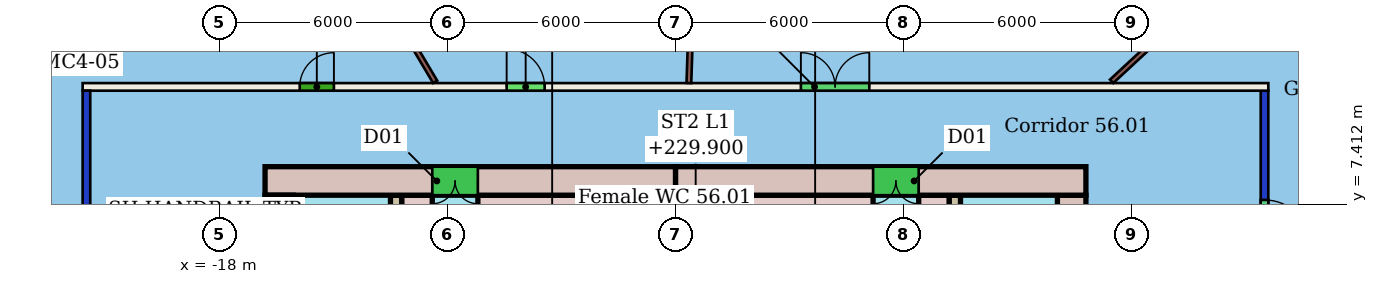
"""IFC4 building model, lengths in metres.
Left out: names, types, materials, properties, quantities, classifications, styles, units other than length and angle.
Written with IfcOpenShell. Run it as: python <this file> out.ifc"""

import sys

from ifc_helpers import new_model, si_unit, direction, frame, frame_2d, origin, place, context, subcontext, project, spatial, rectangle, extrude, element, fill, save


model = new_model("IFC4")
c1 = context("Model", 3, precision=1e-05, world=origin(), true_north=direction((0.0, 1.0)))
c2 = subcontext(c1, "Body", "Model", "MODEL_VIEW")
j1 = project(units=[si_unit("LENGTHUNIT", "METRE"), si_unit("PLANEANGLEUNIT", "RADIAN")], contexts=[c1])
p1 = place(None, origin())
s1 = spatial("IfcSite", under=j1, at=p1, CompositionType="ELEMENT")
p2 = place(p1, origin())
s2 = spatial("IfcBuilding", under=s1, at=p2, CompositionType="ELEMENT")
p3 = place(p2, frame((0.0, 0.0, 228.1)))
s3 = spatial("IfcBuildingStorey", under=s2, at=p3, CompositionType="ELEMENT", Elevation=228.1)
p4 = place(p3, frame((-21.5, -10.4, 0.0), z_axis=(0.0, 0.0, 1.0), x_axis=(0.0, 1.0, 0.0)))
e1 = element("IfcWall", 1, at=p4, inside=s3, PredefinedType="PARTITIONING", context=c2, shape_type="SweptSolid", body=[
    extrude(rectangle(XDim=20.8, YDim=0.2, at=frame_2d((10.4, 0.0))), origin(), (0.0, 0.0, 1.0), 3.05),
])
p5 = place(p4, frame((14.597, 0.0, 0.0)))
e2 = element("IfcOpeningElement", 2, at=p5, cuts=e1, PredefinedType="OPENING", context=c2, shape_type="SweptSolid", body=[
    extrude(rectangle(XDim=1.0, YDim=2.4, at=frame_2d((0.5, 1.2))), frame((0.0, 0.11, 0.0), z_axis=(0.0, -1.0, 0.0), x_axis=(1.0, 0.0, 0.0)), (0.0, 0.0, 1.0), 0.22),
])
p6 = place(p4, frame((7.884, 0.0, 0.0)))
e3 = element("IfcOpeningElement", 3, at=p6, cuts=e1, PredefinedType="OPENING", context=c2, shape_type="SweptSolid", body=[
    extrude(rectangle(XDim=1.0, YDim=2.4, at=frame_2d((0.5, 1.2))), frame((0.0, 0.11, 0.0), z_axis=(0.0, -1.0, 0.0), x_axis=(1.0, 0.0, 0.0)), (0.0, 0.0, 1.0), 0.22),
])
p7 = place(p3, frame((-21.6, 10.5, 0.0), z_axis=(0.0, 0.0, 1.0), x_axis=(1.0, 0.0, 0.0)))
e4 = element("IfcWall", 4, at=p7, inside=s3, PredefinedType="PARTITIONING", context=c2, shape_type="SweptSolid", body=[
    extrude(rectangle(XDim=31.2, YDim=0.2, at=frame_2d((15.6, 0.0))), origin(), (0.0, 0.0, 1.0), 3.45),
])
p8 = place(p7, frame((11.157, 0.0, 0.0)))
e5 = element("IfcOpeningElement", 5, at=p8, cuts=e4, PredefinedType="OPENING", context=c2, shape_type="SweptSolid", body=[
    extrude(rectangle(XDim=1.0, YDim=2.4, at=frame_2d((0.5, 1.2))), frame((0.0, 0.11, 0.0), z_axis=(0.0, -1.0, 0.0), x_axis=(1.0, 0.0, 0.0)), (0.0, 0.0, 1.0), 0.22),
])
p9 = place(p7, frame((5.712, 0.0, 0.0)))
e6 = element("IfcOpeningElement", 6, at=p9, cuts=e4, PredefinedType="OPENING", context=c2, shape_type="SweptSolid", body=[
    extrude(rectangle(XDim=0.9, YDim=2.1, at=frame_2d((0.45, 1.05))), frame((0.0, 0.11, 0.0), z_axis=(0.0, -1.0, 0.0), x_axis=(1.0, 0.0, 0.0)), (0.0, 0.0, 1.0), 0.22),
])
p10 = place(p7, frame((18.9, 0.0, 0.0)))
e7 = element("IfcOpeningElement", 7, at=p10, cuts=e4, PredefinedType="OPENING", context=c2, shape_type="SweptSolid", body=[
    extrude(rectangle(XDim=1.8, YDim=2.1, at=frame_2d((0.9, 1.05))), frame((0.0, 0.11, 0.0), z_axis=(0.0, -1.0, 0.0), x_axis=(1.0, 0.0, 0.0)), (0.0, 0.0, 1.0), 0.22),
])
p11 = place(p3, frame((9.5, 10.4, 0.0), z_axis=(0.0, 0.0, 1.0), x_axis=(0.0, -1.0, 0.0)))
e8 = element("IfcWall", 8, at=p11, inside=s3, PredefinedType="PARTITIONING", context=c2, shape_type="SweptSolid", body=[
    extrude(rectangle(XDim=20.8, YDim=0.2, at=frame_2d((10.4, 0.0))), origin(), (0.0, 0.0, 1.0), 3.05),
])
p12 = place(p11, frame((16.182, 0.0, 0.0)))
e9 = element("IfcOpeningElement", 9, at=p12, cuts=e8, PredefinedType="OPENING", context=c2, shape_type="SweptSolid", body=[
    extrude(rectangle(XDim=1.0, YDim=2.4, at=frame_2d((0.5, 1.2))), frame((0.0, 0.11, 0.0), z_axis=(0.0, -1.0, 0.0), x_axis=(1.0, 0.0, 0.0)), (0.0, 0.0, 1.0), 0.22),
])
p13 = place(p11, frame((12.086, 0.0, 0.0)))
e10 = element("IfcOpeningElement", 10, at=p13, cuts=e8, PredefinedType="OPENING", context=c2, shape_type="SweptSolid", body=[
    extrude(rectangle(XDim=1.0, YDim=2.4, at=frame_2d((0.5, 1.2))), frame((0.0, 0.11, 0.0), z_axis=(0.0, -1.0, 0.0), x_axis=(1.0, 0.0, 0.0)), (0.0, 0.0, 1.0), 0.22),
])
p14 = place(p11, frame((6.779, 0.0, 0.0)))
e11 = element("IfcOpeningElement", 11, at=p14, cuts=e8, PredefinedType="OPENING", context=c2, shape_type="SweptSolid", body=[
    extrude(rectangle(XDim=0.9, YDim=2.1, at=frame_2d((0.45, 1.05))), frame((0.0, 0.11, 0.0), z_axis=(0.0, -1.0, 0.0), x_axis=(1.0, 0.0, 0.0)), (0.0, 0.0, 1.0), 0.22),
])
p15 = place(p11, frame((2.875, 0.0, 0.0)))
e12 = element("IfcOpeningElement", 12, at=p15, cuts=e8, PredefinedType="OPENING", context=c2, shape_type="SweptSolid", body=[
    extrude(rectangle(XDim=1.2, YDim=2.4, at=frame_2d((0.6, 1.2))), frame((0.0, 0.11, 0.0), z_axis=(0.0, -1.0, 0.0), x_axis=(1.0, 0.0, 0.0)), (0.0, 0.0, 1.0), 0.22),
])
p16 = place(p3, frame((-5.193, 24.265, 0.0), z_axis=(0.0, 0.0, 1.0), x_axis=(-0.033235742761, -0.999447540096, 0.0)))
e13 = element("IfcWall", 13, at=p16, inside=s3, PredefinedType="PARTITIONING", context=c2, shape_type="SweptSolid", body=[
    extrude(rectangle(XDim=13.67, YDim=0.125, at=frame_2d((6.835, 0.0))), origin(), (0.0, 0.0, 1.0), 3.45),
])
p17 = place(p3, frame((-17.283, 18.97, 0.0), z_axis=(0.0, 0.0, 1.0), x_axis=(0.51119848964, -0.859462683419, 0.0)))
e14 = element("IfcWall", 14, at=p17, inside=s3, PredefinedType="PARTITIONING", context=c2, shape_type="SweptSolid", body=[
    extrude(rectangle(XDim=9.702, YDim=0.125, at=frame_2d((4.851, 0.0))), origin(), (0.0, 0.0, 1.0), 3.45),
])
p18 = place(p3, frame((-26.344, 8.562, 0.0), z_axis=(0.0, 0.0, 1.0), x_axis=(0.921707152803, -0.387886484002, 0.0)))
e15 = element("IfcWall", 15, at=p18, inside=s3, PredefinedType="PARTITIONING", context=c2, shape_type="SweptSolid", body=[
    extrude(rectangle(XDim=5.121, YDim=0.125, at=frame_2d((2.561, 0.0))), origin(), (0.0, 0.0, 1.0), 3.45),
])
p19 = place(p3, frame((13.437, 18.031, 0.0), z_axis=(0.0, 0.0, 1.0), x_axis=(-0.733128123603, -0.680090548665, 0.0)))
e16 = element("IfcWall", 16, at=p19, inside=s3, PredefinedType="PARTITIONING", context=c2, shape_type="SweptSolid", body=[
    extrude(rectangle(XDim=10.859, YDim=0.125, at=frame_2d((5.429, 0.0))), origin(), (0.0, 0.0, 1.0), 3.45),
])
p20 = place(p3, frame((4.8, 8.025, 0.0), z_axis=(0.0, 0.0, 1.0), x_axis=(-1.0, 0.0, 0.0)))
e17 = element("IfcWall", 17, at=p20, inside=s3, PredefinedType="SHEAR", context=c2, shape_type="SweptSolid", body=[
    extrude(rectangle(XDim=10.8, YDim=0.75, at=frame_2d((5.4, 0.0))), origin(), (0.0, 0.0, 1.0), 3.3),
])
p21 = place(p20, frame((4.4, 0.0, 0.0)))
e18 = element("IfcOpeningElement", 18, at=p21, cuts=e17, PredefinedType="OPENING", context=c2, shape_type="SweptSolid", body=[
    extrude(rectangle(XDim=1.2, YDim=2.1, at=frame_2d((0.6, 1.05))), frame((0.0, 0.385, 0.0), z_axis=(0.0, -1.0, 0.0), x_axis=(1.0, 0.0, 0.0)), (0.0, 0.0, 1.0), 0.77),
])
p22 = place(p3, frame((-6.0, 8.025, 0.0), z_axis=(0.0, 0.0, 1.0), x_axis=(-1.0, 0.0, 0.0)))
e19 = element("IfcWall", 19, at=p22, inside=s3, PredefinedType="SHEAR", context=c2, shape_type="SweptSolid", body=[
    extrude(rectangle(XDim=10.8, YDim=0.75, at=frame_2d((5.4, 0.0))), origin(), (0.0, 0.0, 1.0), 3.3),
])
p23 = place(p22, frame((5.2, 0.0, 0.0)))
e20 = element("IfcOpeningElement", 20, at=p23, cuts=e19, PredefinedType="OPENING", context=c2, shape_type="SweptSolid", body=[
    extrude(rectangle(XDim=1.2, YDim=2.1, at=frame_2d((0.6, 1.05))), frame((0.0, 0.385, 0.0), z_axis=(0.0, -1.0, 0.0), x_axis=(1.0, 0.0, 0.0)), (0.0, 0.0, 1.0), 0.77),
])
p24 = place(p3, frame((-16.425, 7.65, 0.0), z_axis=(0.0, 0.0, 1.0), x_axis=(0.0, -1.0, 0.0)))
e21 = element("IfcWall", 21, at=p24, inside=s3, PredefinedType="SHEAR", context=c2, shape_type="SweptSolid", body=[
    extrude(rectangle(XDim=15.3, YDim=0.75, at=frame_2d((7.65, 0.0))), origin(), (0.0, 0.0, 1.0), 3.3),
])
p25 = place(p24, frame((11.25, 0.0, 0.0)))
e22 = element("IfcOpeningElement", 22, at=p25, cuts=e21, PredefinedType="OPENING", context=c2, shape_type="SweptSolid", body=[
    extrude(rectangle(XDim=1.2, YDim=2.1, at=frame_2d((0.6, 1.05))), frame((0.0, 0.385, 0.0), z_axis=(0.0, -1.0, 0.0), x_axis=(1.0, 0.0, 0.0)), (0.0, 0.0, 1.0), 0.77),
])
p26 = place(p24, frame((2.85, 0.0, 0.0)))
e23 = element("IfcOpeningElement", 23, at=p26, cuts=e21, PredefinedType="OPENING", context=c2, shape_type="SweptSolid", body=[
    extrude(rectangle(XDim=1.2, YDim=2.1, at=frame_2d((0.6, 1.05))), frame((0.0, 0.385, 0.0), z_axis=(0.0, -1.0, 0.0), x_axis=(1.0, 0.0, 0.0)), (0.0, 0.0, 1.0), 0.77),
])
p27 = place(p3, frame((4.425, -7.65, 0.0), z_axis=(0.0, 0.0, 1.0), x_axis=(0.0, 1.0, 0.0)))
e24 = element("IfcWall", 24, at=p27, inside=s3, PredefinedType="SHEAR", context=c2, shape_type="SweptSolid", body=[
    extrude(rectangle(XDim=15.3, YDim=0.75, at=frame_2d((7.65, 0.0))), origin(), (0.0, 0.0, 1.0), 3.3),
])
p28 = place(p27, frame((2.85, 0.0, 0.0)))
e25 = element("IfcOpeningElement", 25, at=p28, cuts=e24, PredefinedType="OPENING", context=c2, shape_type="SweptSolid", body=[
    extrude(rectangle(XDim=1.2, YDim=2.1, at=frame_2d((0.6, 1.05))), frame((0.0, 0.385, 0.0), z_axis=(0.0, -1.0, 0.0), x_axis=(1.0, 0.0, 0.0)), (0.0, 0.0, 1.0), 0.77),
])
p29 = place(p27, frame((11.25, 0.0, 0.0)))
e26 = element("IfcOpeningElement", 26, at=p29, cuts=e24, PredefinedType="OPENING", context=c2, shape_type="SweptSolid", body=[
    extrude(rectangle(XDim=1.2, YDim=2.1, at=frame_2d((0.6, 1.05))), frame((0.0, 0.385, 0.0), z_axis=(0.0, -1.0, 0.0), x_axis=(1.0, 0.0, 0.0)), (0.0, 0.0, 1.0), 0.77),
])
p30 = place(p3, frame((-13.35, 7.65, 0.0), z_axis=(0.0, 0.0, 1.0), x_axis=(0.0, -1.0, 0.0)))
e27 = element("IfcWall", 27, at=p30, inside=s3, PredefinedType="SHEAR", context=c2, shape_type="SweptSolid", body=[
    extrude(rectangle(XDim=15.3, YDim=0.3, at=frame_2d((7.65, 0.0))), origin(), (0.0, 0.0, 1.0), 3.3),
])
p31 = place(p30, frame((6.9, 0.0, 0.0)))
e28 = element("IfcOpeningElement", 28, at=p31, cuts=e27, PredefinedType="OPENING", context=c2, shape_type="SweptSolid", body=[
    extrude(rectangle(XDim=1.5, YDim=2.1, at=frame_2d((0.75, 1.05))), frame((0.0, 0.16, 0.0), z_axis=(0.0, -1.0, 0.0), x_axis=(1.0, 0.0, 0.0)), (0.0, 0.0, 1.0), 0.32),
])
p32 = place(p3, frame((1.35, -7.65, 0.0), z_axis=(0.0, 0.0, 1.0), x_axis=(0.0, 1.0, 0.0)))
e29 = element("IfcWall", 29, at=p32, inside=s3, PredefinedType="SHEAR", context=c2, shape_type="SweptSolid", body=[
    extrude(rectangle(XDim=15.3, YDim=0.3, at=frame_2d((7.65, 0.0))), origin(), (0.0, 0.0, 1.0), 3.3),
])
p33 = place(p32, frame((1.56, 0.0, 0.0)))
e30 = element("IfcOpeningElement", 30, at=p33, cuts=e29, PredefinedType="OPENING", context=c2, shape_type="SweptSolid", body=[
    extrude(rectangle(XDim=1.0, YDim=2.1, at=frame_2d((0.5, 1.05))), frame((0.0, 0.16, 0.0), z_axis=(0.0, -1.0, 0.0), x_axis=(1.0, 0.0, 0.0)), (0.0, 0.0, 1.0), 0.32),
])
p34 = place(p32, frame((6.9, 0.0, 0.0)))
e31 = element("IfcOpeningElement", 31, at=p34, cuts=e29, PredefinedType="OPENING", context=c2, shape_type="SweptSolid", body=[
    extrude(rectangle(XDim=1.5, YDim=2.1, at=frame_2d((0.75, 1.05))), frame((0.0, 0.16, 0.0), z_axis=(0.0, -1.0, 0.0), x_axis=(1.0, 0.0, 0.0)), (0.0, 0.0, 1.0), 0.32),
])
p35 = place(p3, frame((-6.0, 3.88, 0.0), z_axis=(0.0, 0.0, 1.0), x_axis=(0.0, 1.0, 0.0)))
e32 = element("IfcWall", 32, at=p35, inside=s3, PredefinedType="SHEAR", context=c2, shape_type="SweptSolid", body=[
    extrude(rectangle(XDim=3.77, YDim=0.3, at=frame_2d((1.885, 0.0))), origin(), (0.0, 0.0, 1.0), 3.3),
])
p36 = place(p3, frame((-13.2, 7.475, 0.0), z_axis=(0.0, 0.0, 1.0), x_axis=(1.0, 0.0, 0.0)))
e33 = element("IfcWall", 33, at=p36, inside=s3, PredefinedType="SHEAR", context=c2, shape_type="SweptSolid", body=[
    extrude(rectangle(XDim=0.8, YDim=0.35, at=frame_2d((0.4, 0.0))), origin(), (0.0, 0.0, 1.0), 3.3),
])
for number, where, z_axis, x_axis in (
    (34, (-11.2, 7.475, 0.0), (0.0, 0.0, 1.0), (1.0, 0.0, 0.0)),
    (35, (-5.85, 7.475, 0.0), (0.0, 0.0, 1.0), (1.0, 0.0, 0.0)),
):
    element("IfcWall", number, at=place(p3, frame(where, z_axis=z_axis, x_axis=x_axis)), inside=s3, PredefinedType="SHEAR", context=c2, shape_type="SweptSolid", body=[
        extrude(rectangle(XDim=5.05, YDim=0.35, at=frame_2d((2.525, 0.0))), origin(), (0.0, 0.0, 1.0), 3.3),
    ])
p37 = place(p3, frame((0.4, 7.475, 0.0), z_axis=(0.0, 0.0, 1.0), x_axis=(1.0, 0.0, 0.0)))
e36 = element("IfcWall", 36, at=p37, inside=s3, PredefinedType="SHEAR", context=c2, shape_type="SweptSolid", body=[
    extrude(rectangle(XDim=0.8, YDim=0.35, at=frame_2d((0.4, 0.0))), origin(), (0.0, 0.0, 1.0), 3.3),
])
p38 = place(p8, origin())
e37 = element("IfcDoor", 37, at=p38, inside=s3, OperationType="SINGLE_SWING_LEFT", PredefinedType="DOOR", context=c2, shape_type="SweptSolid", body=[
    extrude(rectangle(XDim=1.0, YDim=2.4, at=frame_2d((0.5, 1.2))), frame((0.0, 0.025, 0.0), z_axis=(0.0, -1.0, 0.0), x_axis=(1.0, 0.0, 0.0)), (0.0, 0.0, 1.0), 0.05),
])
fill(e5, e37)
p39 = place(p9, origin())
e38 = element("IfcDoor", 38, at=p39, inside=s3, OperationType="SINGLE_SWING_RIGHT", PredefinedType="DOOR", context=c2, shape_type="SweptSolid", body=[
    extrude(rectangle(XDim=0.9, YDim=2.1, at=frame_2d((0.45, 1.05))), frame((0.0, 0.025, 0.0), z_axis=(0.0, -1.0, 0.0), x_axis=(1.0, 0.0, 0.0)), (0.0, 0.0, 1.0), 0.05),
])
fill(e6, e38)
p40 = place(p15, origin())
e39 = element("IfcDoor", 39, at=p40, inside=s3, OperationType="SINGLE_SWING_RIGHT", PredefinedType="DOOR", context=c2, shape_type="SweptSolid", body=[
    extrude(rectangle(XDim=1.2, YDim=2.4, at=frame_2d((0.6, 1.2))), frame((0.0, 0.025, 0.0), z_axis=(0.0, -1.0, 0.0), x_axis=(1.0, 0.0, 0.0)), (0.0, 0.0, 1.0), 0.05),
])
fill(e12, e39)
p41 = place(p10, origin())
e40 = element("IfcDoor", 40, at=p41, inside=s3, OperationType="DOUBLE_DOOR_SINGLE_SWING", PredefinedType="DOOR", context=c2, shape_type="SweptSolid", body=[
    extrude(rectangle(XDim=1.8, YDim=2.1, at=frame_2d((0.9, 1.05))), frame((0.0, 0.025, 0.0), z_axis=(0.0, -1.0, 0.0), x_axis=(1.0, 0.0, 0.0)), (0.0, 0.0, 1.0), 0.05),
])
fill(e7, e40)
p42 = place(p21, origin())
e41 = element("IfcDoor", 41, at=p42, inside=s3, OperationType="DOUBLE_DOOR_SINGLE_SWING", PredefinedType="NOTDEFINED", context=c2, shape_type="SweptSolid", body=[
    extrude(rectangle(XDim=1.2, YDim=2.1, at=frame_2d((0.6, 1.05))), frame((0.0, 0.025, 0.0), z_axis=(0.0, -1.0, 0.0), x_axis=(1.0, 0.0, 0.0)), (0.0, 0.0, 1.0), 0.05),
])
fill(e18, e41)
p43 = place(p23, origin())
e42 = element("IfcDoor", 42, at=p43, inside=s3, OperationType="DOUBLE_DOOR_SINGLE_SWING", PredefinedType="NOTDEFINED", context=c2, shape_type="SweptSolid", body=[
    extrude(rectangle(XDim=1.2, YDim=2.1, at=frame_2d((0.6, 1.05))), frame((0.0, 0.025, 0.0), z_axis=(0.0, -1.0, 0.0), x_axis=(1.0, 0.0, 0.0)), (0.0, 0.0, 1.0), 0.05),
])
fill(e20, e42)
save(model, sys.argv[1])
